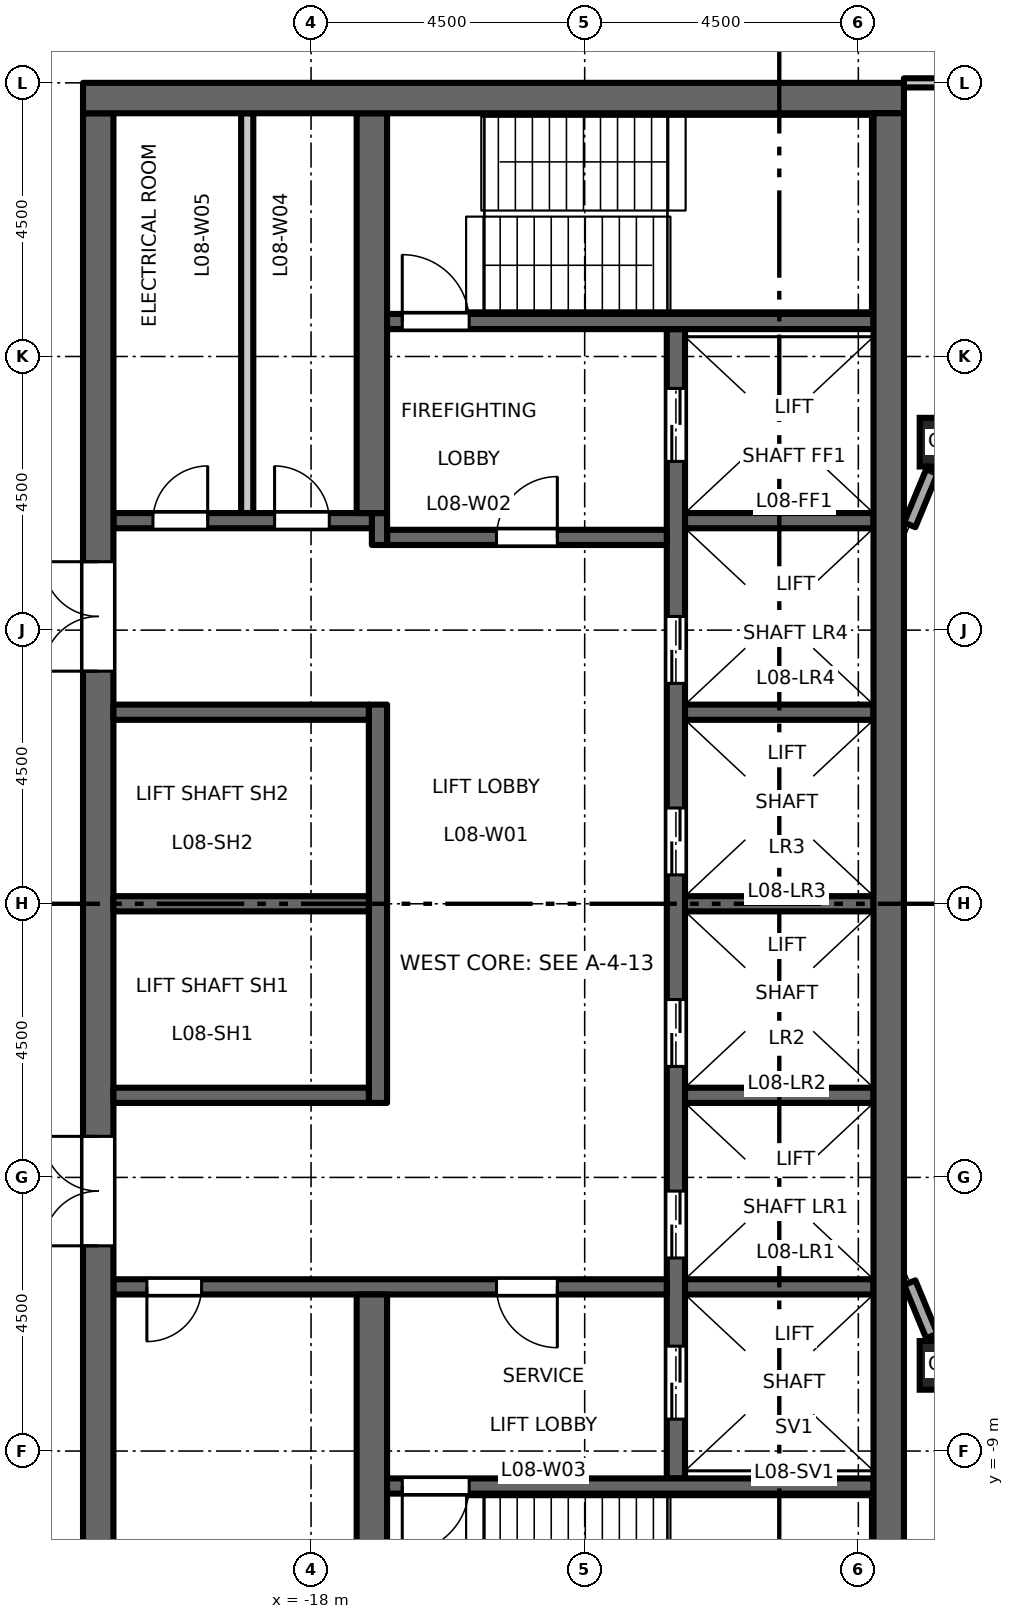
"""IFC4 building model, lengths in metres.
Left out: names, types, materials, properties, quantities, classifications, styles, units other than length and angle.
Written with IfcOpenShell. Run it as: python <this file> out.ifc"""

import sys

from ifc_helpers import new_model, si_unit, direction, frame, frame_2d, origin, origin_2d, place, context, subcontext, project, spatial, rectangle, hollow_rectangle, extrude, element, fill, save


model = new_model("IFC4")
c1 = context("Model", 3, precision=1e-05, world=origin(), true_north=direction((0.0, 1.0)))
c2 = subcontext(c1, "Body", "Model", "MODEL_VIEW")
j1 = project(units=[si_unit("LENGTHUNIT", "METRE"), si_unit("PLANEANGLEUNIT", "RADIAN")], contexts=[c1])
p1 = place(None, origin())
s1 = spatial("IfcSite", under=j1, at=p1, CompositionType="ELEMENT")
p2 = place(p1, origin())
s2 = spatial("IfcBuilding", under=s1, at=p2, CompositionType="ELEMENT")
p3 = place(p2, frame((0.0, 0.0, 40.2)))
s3 = spatial("IfcBuildingStorey", under=s2, at=p3, CompositionType="ELEMENT", Elevation=40.2)
for number, where, z_axis, x_axis in (
    (1, (-7.591, -7.591, 0.0), (0.0, 0.0, 1.0), (1.0, 0.0, 0.0)),
    (2, (-7.591, 7.591, 0.0), (0.0, 0.0, 1.0), (1.0, 0.0, 0.0)),
):
    element("IfcColumn", number, at=place(p3, frame(where, z_axis=z_axis, x_axis=x_axis)), inside=s3, PredefinedType="COLUMN", context=c2, shape_type="SweptSolid", body=[
        extrude(hollow_rectangle(XDim=0.8, YDim=0.8, WallThickness=0.05, at=origin_2d()), origin(), (0.0, 0.0, 1.0), 4.5),
    ])
p4 = place(p3, frame((-12.0, -9.45, 0.0), z_axis=(0.0, 0.0, 1.0), x_axis=(0.0, 1.0, 0.0)))
e3 = element("IfcWall", 3, at=p4, inside=s3, PredefinedType="SHEAR", context=c2, shape_type="SweptSolid", body=[
    extrude(rectangle(XDim=18.9, YDim=0.3, at=frame_2d((9.45, 0.0))), origin(), (0.0, 0.0, 1.0), 4.35),
])
p5 = place(p4, frame((3.625, 0.0, 0.0)))
e4 = element("IfcOpeningElement", 4, at=p5, cuts=e3, PredefinedType="OPENING", context=c2, shape_type="SweptSolid", body=[
    extrude(rectangle(XDim=1.1, YDim=2.1, at=frame_2d((0.55, 1.05))), frame((0.0, 0.16, 0.0), z_axis=(0.0, -1.0, 0.0), x_axis=(1.0, 0.0, 0.0)), (0.0, 0.0, 1.0), 0.32),
])
p6 = place(p4, frame((6.775, 0.0, 0.0)))
e5 = element("IfcOpeningElement", 5, at=p6, cuts=e3, PredefinedType="OPENING", context=c2, shape_type="SweptSolid", body=[
    extrude(rectangle(XDim=1.1, YDim=2.1, at=frame_2d((0.55, 1.05))), frame((0.0, 0.16, 0.0), z_axis=(0.0, -1.0, 0.0), x_axis=(1.0, 0.0, 0.0)), (0.0, 0.0, 1.0), 0.32),
])
p7 = place(p4, frame((9.925, 0.0, 0.0)))
e6 = element("IfcOpeningElement", 6, at=p7, cuts=e3, PredefinedType="OPENING", context=c2, shape_type="SweptSolid", body=[
    extrude(rectangle(XDim=1.1, YDim=2.1, at=frame_2d((0.55, 1.05))), frame((0.0, 0.16, 0.0), z_axis=(0.0, -1.0, 0.0), x_axis=(1.0, 0.0, 0.0)), (0.0, 0.0, 1.0), 0.32),
])
p8 = place(p4, frame((13.075, 0.0, 0.0)))
e7 = element("IfcOpeningElement", 7, at=p8, cuts=e3, PredefinedType="OPENING", context=c2, shape_type="SweptSolid", body=[
    extrude(rectangle(XDim=1.1, YDim=2.1, at=frame_2d((0.55, 1.05))), frame((0.0, 0.16, 0.0), z_axis=(0.0, -1.0, 0.0), x_axis=(1.0, 0.0, 0.0)), (0.0, 0.0, 1.0), 0.32),
])
p9 = place(p4, frame((16.725, 0.0, 0.0)))
e8 = element("IfcOpeningElement", 8, at=p9, cuts=e3, PredefinedType="OPENING", context=c2, shape_type="SweptSolid", body=[
    extrude(rectangle(XDim=1.2, YDim=2.1, at=frame_2d((0.6, 1.05))), frame((0.0, 0.16, 0.0), z_axis=(0.0, -1.0, 0.0), x_axis=(1.0, 0.0, 0.0)), (0.0, 0.0, 1.0), 0.32),
])
p10 = place(p4, frame((0.975, 0.0, 0.0)))
e9 = element("IfcOpeningElement", 9, at=p10, cuts=e3, PredefinedType="OPENING", context=c2, shape_type="SweptSolid", body=[
    extrude(rectangle(XDim=1.2, YDim=2.1, at=frame_2d((0.6, 1.05))), frame((0.0, 0.16, 0.0), z_axis=(0.0, -1.0, 0.0), x_axis=(1.0, 0.0, 0.0)), (0.0, 0.0, 1.0), 0.32),
])
p11 = place(p3, frame((-12.15, 6.025, 0.0), z_axis=(0.0, 0.0, 1.0), x_axis=(-1.0, 0.0, 0.0)))
e10 = element("IfcWall", 10, at=p11, inside=s3, PredefinedType="SHEAR", context=c2, shape_type="SweptSolid", body=[
    extrude(rectangle(XDim=4.6, YDim=0.25, at=frame_2d((2.3, 0.0))), origin(), (0.0, 0.0, 1.0), 4.35),
])
p12 = place(p11, frame((1.8, 0.0, 0.0)))
e11 = element("IfcOpeningElement", 11, at=p12, cuts=e10, PredefinedType="OPENING", context=c2, shape_type="SweptSolid", body=[
    extrude(rectangle(XDim=1.0, YDim=2.1, at=frame_2d((0.5, 1.05))), frame((0.0, 0.135, 0.0), z_axis=(0.0, -1.0, 0.0), x_axis=(1.0, 0.0, 0.0)), (0.0, 0.0, 1.0), 0.27),
])
p13 = place(p3, frame((-16.875, 5.9, 0.0), z_axis=(0.0, 0.0, 1.0), x_axis=(0.0, 1.0, 0.0)))
e12 = element("IfcWall", 12, at=p13, inside=s3, PredefinedType="SHEAR", context=c2, shape_type="SweptSolid", body=[
    extrude(rectangle(XDim=0.525, YDim=0.25, at=frame_2d((0.263, 0.0))), origin(), (0.0, 0.0, 1.0), 4.35),
])
p14 = place(p3, frame((-17.0, 6.3, 0.0), z_axis=(0.0, 0.0, 1.0), x_axis=(-1.0, 0.0, 0.0)))
e13 = element("IfcWall", 13, at=p14, inside=s3, PredefinedType="SHEAR", context=c2, shape_type="SweptSolid", body=[
    extrude(rectangle(XDim=4.25, YDim=0.25, at=frame_2d((2.125, 0.0))), origin(), (0.0, 0.0, 1.0), 4.35),
])
p15 = place(p14, frame((0.7, 0.0, 0.0)))
e14 = element("IfcOpeningElement", 14, at=p15, cuts=e13, PredefinedType="OPENING", context=c2, shape_type="SweptSolid", body=[
    extrude(rectangle(XDim=0.9, YDim=2.1, at=frame_2d((0.45, 1.05))), frame((0.0, 0.135, 0.0), z_axis=(0.0, -1.0, 0.0), x_axis=(1.0, 0.0, 0.0)), (0.0, 0.0, 1.0), 0.27),
])
p16 = place(p14, frame((2.7, 0.0, 0.0)))
e15 = element("IfcOpeningElement", 15, at=p16, cuts=e13, PredefinedType="OPENING", context=c2, shape_type="SweptSolid", body=[
    extrude(rectangle(XDim=0.9, YDim=2.1, at=frame_2d((0.45, 1.05))), frame((0.0, 0.135, 0.0), z_axis=(0.0, -1.0, 0.0), x_axis=(1.0, 0.0, 0.0)), (0.0, 0.0, 1.0), 0.27),
])
p17 = place(p3, frame((-12.15, -6.3, 0.0), z_axis=(0.0, 0.0, 1.0), x_axis=(-1.0, 0.0, 0.0)))
e16 = element("IfcWall", 16, at=p17, inside=s3, PredefinedType="SHEAR", context=c2, shape_type="SweptSolid", body=[
    extrude(rectangle(XDim=9.1, YDim=0.25, at=frame_2d((4.55, 0.0))), origin(), (0.0, 0.0, 1.0), 4.35),
])
p18 = place(p17, frame((1.8, 0.0, 0.0)))
e17 = element("IfcOpeningElement", 17, at=p18, cuts=e16, PredefinedType="OPENING", context=c2, shape_type="SweptSolid", body=[
    extrude(rectangle(XDim=1.0, YDim=2.1, at=frame_2d((0.5, 1.05))), frame((0.0, 0.135, 0.0), z_axis=(0.0, -1.0, 0.0), x_axis=(1.0, 0.0, 0.0)), (0.0, 0.0, 1.0), 0.27),
])
p19 = place(p17, frame((7.65, 0.0, 0.0)))
e18 = element("IfcOpeningElement", 18, at=p19, cuts=e16, PredefinedType="OPENING", context=c2, shape_type="SweptSolid", body=[
    extrude(rectangle(XDim=0.9, YDim=2.1, at=frame_2d((0.45, 1.05))), frame((0.0, 0.135, 0.0), z_axis=(0.0, -1.0, 0.0), x_axis=(1.0, 0.0, 0.0)), (0.0, 0.0, 1.0), 0.27),
])
p20 = place(p3, frame((-21.5, -13.0, 0.0), z_axis=(0.0, 0.0, 1.0), x_axis=(0.0, 1.0, 0.0)))
e19 = element("IfcWall", 19, at=p20, inside=s3, PredefinedType="SHEAR", context=c2, shape_type="SweptSolid", body=[
    extrude(rectangle(XDim=26.0, YDim=0.5, at=frame_2d((13.0, 0.0))), origin(), (0.0, 0.0, 1.0), 4.35),
])
p21 = place(p20, frame((16.825, 0.0, 0.0)))
e20 = element("IfcOpeningElement", 20, at=p21, cuts=e19, PredefinedType="OPENING", context=c2, shape_type="SweptSolid", body=[
    extrude(rectangle(XDim=1.8, YDim=2.1, at=frame_2d((0.9, 1.05))), frame((0.0, 0.26, 0.0), z_axis=(0.0, -1.0, 0.0), x_axis=(1.0, 0.0, 0.0)), (0.0, 0.0, 1.0), 0.52),
])
p22 = place(p20, frame((7.375, 0.0, 0.0)))
e21 = element("IfcOpeningElement", 21, at=p22, cuts=e19, PredefinedType="OPENING", context=c2, shape_type="SweptSolid", body=[
    extrude(rectangle(XDim=1.8, YDim=2.1, at=frame_2d((0.9, 1.05))), frame((0.0, 0.26, 0.0), z_axis=(0.0, -1.0, 0.0), x_axis=(1.0, 0.0, 0.0)), (0.0, 0.0, 1.0), 0.52),
])
p23 = place(p3, frame((-19.05, 6.425, 0.0), z_axis=(0.0, 0.0, 1.0), x_axis=(0.0, 1.0, 0.0)))
e22 = element("IfcWall", 22, at=p23, inside=s3, PredefinedType="PARTITIONING", context=c2, shape_type="SweptSolid", body=[
    extrude(rectangle(XDim=6.575, YDim=0.2, at=frame_2d((3.288, 0.0))), origin(), (0.0, 0.0, 1.0), 4.35),
])
p24 = place(p3, frame((-16.9, -3.275, 0.0), z_axis=(0.0, 0.0, 1.0), x_axis=(0.0, 1.0, 0.0)))
e23 = element("IfcWall", 23, at=p24, inside=s3, PredefinedType="SHEAR", context=c2, shape_type="SweptSolid", body=[
    extrude(rectangle(XDim=6.55, YDim=0.3, at=frame_2d((3.275, 0.0))), origin(), (0.0, 0.0, 1.0), 4.35),
])
for number, where, z_axis, x_axis in (
    (24, (-17.05, 0.0, 0.0), (0.0, 0.0, 1.0), (-1.0, 0.0, 0.0)),
    (25, (-17.05, 3.15, 0.0), (0.0, 0.0, 1.0), (-1.0, 0.0, 0.0)),
    (26, (-17.05, -3.15, 0.0), (0.0, 0.0, 1.0), (-1.0, 0.0, 0.0)),
):
    element("IfcWall", number, at=place(p3, frame(where, z_axis=z_axis, x_axis=x_axis)), inside=s3, PredefinedType="SHEAR", context=c2, shape_type="SweptSolid", body=[
        extrude(rectangle(XDim=4.2, YDim=0.25, at=frame_2d((2.1, 0.0))), origin(), (0.0, 0.0, 1.0), 4.35),
    ])
for number, where, z_axis, x_axis in (
    (27, (-17.0, 6.425, 0.0), (0.0, 0.0, 1.0), (0.0, 1.0, 0.0)),
    (28, (-17.0, -13.0, 0.0), (0.0, 0.0, 1.0), (0.0, 1.0, 0.0)),
):
    element("IfcWall", number, at=place(p3, frame(where, z_axis=z_axis, x_axis=x_axis)), inside=s3, PredefinedType="SHEAR", context=c2, shape_type="SweptSolid", body=[
        extrude(rectangle(XDim=6.575, YDim=0.5, at=frame_2d((3.288, 0.0))), origin(), (0.0, 0.0, 1.0), 4.35),
    ])
for number, where, z_axis, x_axis in (
    (29, (-8.75, 0.0, 0.0), (0.0, 0.0, 1.0), (-1.0, 0.0, 0.0)),
    (30, (-8.75, 3.15, 0.0), (0.0, 0.0, 1.0), (-1.0, 0.0, 0.0)),
    (31, (-8.75, 6.3, 0.0), (0.0, 0.0, 1.0), (-1.0, 0.0, 0.0)),
    (32, (-8.75, -3.15, 0.0), (0.0, 0.0, 1.0), (-1.0, 0.0, 0.0)),
    (33, (-8.75, -6.3, 0.0), (0.0, 0.0, 1.0), (-1.0, 0.0, 0.0)),
):
    element("IfcWall", number, at=place(p3, frame(where, z_axis=z_axis, x_axis=x_axis)), inside=s3, PredefinedType="SHEAR", context=c2, shape_type="SweptSolid", body=[
        extrude(rectangle(XDim=3.1, YDim=0.25, at=frame_2d((1.55, 0.0))), origin(), (0.0, 0.0, 1.0), 4.35),
    ])
p25 = place(p3, frame((-8.75, 9.575, 0.0), z_axis=(0.0, 0.0, 1.0), x_axis=(-1.0, 0.0, 0.0)))
e34 = element("IfcWall", 34, at=p25, inside=s3, PredefinedType="SHEAR", context=c2, shape_type="SweptSolid", body=[
    extrude(rectangle(XDim=8.0, YDim=0.25, at=frame_2d((4.0, 0.0))), origin(), (0.0, 0.0, 1.0), 4.35),
])
p26 = place(p25, frame((6.65, 0.0, 0.0)))
e35 = element("IfcOpeningElement", 35, at=p26, cuts=e34, PredefinedType="OPENING", context=c2, shape_type="SweptSolid", body=[
    extrude(rectangle(XDim=1.1, YDim=2.1, at=frame_2d((0.55, 1.05))), frame((0.0, 0.135, 0.0), z_axis=(0.0, -1.0, 0.0), x_axis=(1.0, 0.0, 0.0)), (0.0, 0.0, 1.0), 0.27),
])
p27 = place(p3, frame((-8.75, -9.575, 0.0), z_axis=(0.0, 0.0, 1.0), x_axis=(-1.0, 0.0, 0.0)))
e36 = element("IfcWall", 36, at=p27, inside=s3, PredefinedType="SHEAR", context=c2, shape_type="SweptSolid", body=[
    extrude(rectangle(XDim=8.0, YDim=0.25, at=frame_2d((4.0, 0.0))), origin(), (0.0, 0.0, 1.0), 4.35),
])
p28 = place(p27, frame((6.65, 0.0, 0.0)))
e37 = element("IfcOpeningElement", 37, at=p28, cuts=e36, PredefinedType="OPENING", context=c2, shape_type="SweptSolid", body=[
    extrude(rectangle(XDim=1.1, YDim=2.1, at=frame_2d((0.55, 1.05))), frame((0.0, 0.135, 0.0), z_axis=(0.0, -1.0, 0.0), x_axis=(1.0, 0.0, 0.0)), (0.0, 0.0, 1.0), 0.27),
])
p29 = place(p3, frame((-8.25, 13.25, 0.0), z_axis=(0.0, 0.0, 1.0), x_axis=(-1.0, 0.0, 0.0)))
e38 = element("IfcWall", 38, at=p29, inside=s3, PredefinedType="SHEAR", context=c2, shape_type="SweptSolid", body=[
    extrude(rectangle(XDim=13.5, YDim=0.5, at=frame_2d((6.75, 0.0))), origin(), (0.0, 0.0, 1.0), 4.35),
])
p30 = place(p3, frame((-8.5, -13.0, 0.0), z_axis=(0.0, 0.0, 1.0), x_axis=(0.0, 1.0, 0.0)))
e39 = element("IfcWall", 39, at=p30, inside=s3, PredefinedType="SHEAR", context=c2, shape_type="SweptSolid", body=[
    extrude(rectangle(XDim=26.0, YDim=0.5, at=frame_2d((13.0, 0.0))), origin(), (0.0, 0.0, 1.0), 4.35),
])
for number, where, z_axis, x_axis in (
    (40, (-7.791, 7.108, 0.0), (0.0, 0.0, 1.0), (-0.383, -0.924, 0.0)),
    (41, (-8.154, -6.231, 0.0), (0.0, 0.0, 1.0), (0.383, -0.924, 0.0)),
):
    element("IfcWall", number, at=place(p3, frame(where, z_axis=z_axis, x_axis=x_axis)), inside=s3, PredefinedType="STANDARD", context=c2, shape_type="SweptSolid", body=[
        extrude(rectangle(XDim=0.949, YDim=0.2, at=frame_2d((0.475, 0.0))), origin(), (0.0, 0.0, 1.0), 3.73),
    ])
p31 = place(p3, frame((-8.25, 13.5, 0.0), z_axis=(0.0, 0.0, 1.0), x_axis=(1.0, 0.0, 0.0)))
e42 = element("IfcWall", 42, at=p31, inside=s3, PredefinedType="PARTITIONING", context=c2, shape_type="SweptSolid", body=[
    extrude(rectangle(XDim=16.5, YDim=0.15, at=frame_2d((8.25, 0.0))), origin(), (0.0, 0.0, 1.0), 3.85),
])
p32 = place(p31, frame((0.65, 0.0, 0.0)))
e43 = element("IfcOpeningElement", 43, at=p32, cuts=e42, PredefinedType="OPENING", context=c2, shape_type="SweptSolid", body=[
    extrude(rectangle(XDim=1.0, YDim=2.1, at=frame_2d((0.5, 1.05))), frame((0.0, 0.085, 0.0), z_axis=(0.0, -1.0, 0.0), x_axis=(1.0, 0.0, 0.0)), (0.0, 0.0, 1.0), 0.17),
])
p33 = place(p12, origin())
e44 = element("IfcDoor", 44, at=p33, inside=s3, OperationType="SINGLE_SWING_LEFT", PredefinedType="DOOR", context=c2, shape_type="SweptSolid", body=[
    extrude(rectangle(XDim=1.0, YDim=2.1, at=frame_2d((0.5, 1.05))), frame((0.0, 0.025, 0.0), z_axis=(0.0, -1.0, 0.0), x_axis=(1.0, 0.0, 0.0)), (0.0, 0.0, 1.0), 0.05),
])
fill(e11, e44)
p34 = place(p18, origin())
e45 = element("IfcDoor", 45, at=p34, inside=s3, OperationType="SINGLE_SWING_RIGHT", PredefinedType="DOOR", context=c2, shape_type="SweptSolid", body=[
    extrude(rectangle(XDim=1.0, YDim=2.1, at=frame_2d((0.5, 1.05))), frame((0.0, 0.025, 0.0), z_axis=(0.0, -1.0, 0.0), x_axis=(1.0, 0.0, 0.0)), (0.0, 0.0, 1.0), 0.05),
])
fill(e17, e45)
p35 = place(p26, origin())
e46 = element("IfcDoor", 46, at=p35, inside=s3, OperationType="SINGLE_SWING_RIGHT", PredefinedType="DOOR", context=c2, shape_type="SweptSolid", body=[
    extrude(rectangle(XDim=1.1, YDim=2.1, at=frame_2d((0.55, 1.05))), frame((0.0, 0.025, 0.0), z_axis=(0.0, -1.0, 0.0), x_axis=(1.0, 0.0, 0.0)), (0.0, 0.0, 1.0), 0.05),
])
fill(e35, e46)
p36 = place(p28, origin())
e47 = element("IfcDoor", 47, at=p36, inside=s3, OperationType="SINGLE_SWING_LEFT", PredefinedType="DOOR", context=c2, shape_type="SweptSolid", body=[
    extrude(rectangle(XDim=1.1, YDim=2.1, at=frame_2d((0.55, 1.05))), frame((0.0, 0.025, 0.0), z_axis=(0.0, -1.0, 0.0), x_axis=(1.0, 0.0, 0.0)), (0.0, 0.0, 1.0), 0.05),
])
fill(e37, e47)
p37 = place(p21, origin())
e48 = element("IfcDoor", 48, at=p37, inside=s3, OperationType="DOUBLE_DOOR_DOUBLE_SWING", PredefinedType="DOOR", context=c2, shape_type="SweptSolid", body=[
    extrude(rectangle(XDim=1.8, YDim=2.1, at=frame_2d((0.9, 1.05))), frame((0.0, 0.025, 0.0), z_axis=(0.0, -1.0, 0.0), x_axis=(1.0, 0.0, 0.0)), (0.0, 0.0, 1.0), 0.05),
])
fill(e20, e48)
p38 = place(p22, origin())
e49 = element("IfcDoor", 49, at=p38, inside=s3, OperationType="DOUBLE_DOOR_DOUBLE_SWING", PredefinedType="DOOR", context=c2, shape_type="SweptSolid", body=[
    extrude(rectangle(XDim=1.8, YDim=2.1, at=frame_2d((0.9, 1.05))), frame((0.0, 0.025, 0.0), z_axis=(0.0, -1.0, 0.0), x_axis=(1.0, 0.0, 0.0)), (0.0, 0.0, 1.0), 0.05),
])
fill(e21, e49)
p39 = place(p5, origin())
e50 = element("IfcDoor", 50, at=p39, inside=s3, OperationType="DOUBLE_DOOR_SLIDING", PredefinedType="DOOR", context=c2, shape_type="SweptSolid", body=[
    extrude(rectangle(XDim=1.1, YDim=2.1, at=frame_2d((0.55, 1.05))), frame((0.0, 0.025, 0.0), z_axis=(0.0, -1.0, 0.0), x_axis=(1.0, 0.0, 0.0)), (0.0, 0.0, 1.0), 0.05),
])
fill(e4, e50)
p40 = place(p6, origin())
e51 = element("IfcDoor", 51, at=p40, inside=s3, OperationType="DOUBLE_DOOR_SLIDING", PredefinedType="DOOR", context=c2, shape_type="SweptSolid", body=[
    extrude(rectangle(XDim=1.1, YDim=2.1, at=frame_2d((0.55, 1.05))), frame((0.0, 0.025, 0.0), z_axis=(0.0, -1.0, 0.0), x_axis=(1.0, 0.0, 0.0)), (0.0, 0.0, 1.0), 0.05),
])
fill(e5, e51)
p41 = place(p7, origin())
e52 = element("IfcDoor", 52, at=p41, inside=s3, OperationType="DOUBLE_DOOR_SLIDING", PredefinedType="DOOR", context=c2, shape_type="SweptSolid", body=[
    extrude(rectangle(XDim=1.1, YDim=2.1, at=frame_2d((0.55, 1.05))), frame((0.0, 0.025, 0.0), z_axis=(0.0, -1.0, 0.0), x_axis=(1.0, 0.0, 0.0)), (0.0, 0.0, 1.0), 0.05),
])
fill(e6, e52)
p42 = place(p8, origin())
e53 = element("IfcDoor", 53, at=p42, inside=s3, OperationType="DOUBLE_DOOR_SLIDING", PredefinedType="DOOR", context=c2, shape_type="SweptSolid", body=[
    extrude(rectangle(XDim=1.1, YDim=2.1, at=frame_2d((0.55, 1.05))), frame((0.0, 0.025, 0.0), z_axis=(0.0, -1.0, 0.0), x_axis=(1.0, 0.0, 0.0)), (0.0, 0.0, 1.0), 0.05),
])
fill(e7, e53)
p43 = place(p9, origin())
e54 = element("IfcDoor", 54, at=p43, inside=s3, OperationType="DOUBLE_DOOR_SLIDING", PredefinedType="DOOR", context=c2, shape_type="SweptSolid", body=[
    extrude(rectangle(XDim=1.2, YDim=2.1, at=frame_2d((0.6, 1.05))), frame((0.0, 0.025, 0.0), z_axis=(0.0, -1.0, 0.0), x_axis=(1.0, 0.0, 0.0)), (0.0, 0.0, 1.0), 0.05),
])
fill(e8, e54)
p44 = place(p10, origin())
e55 = element("IfcDoor", 55, at=p44, inside=s3, OperationType="DOUBLE_DOOR_SLIDING", PredefinedType="DOOR", context=c2, shape_type="SweptSolid", body=[
    extrude(rectangle(XDim=1.2, YDim=2.1, at=frame_2d((0.6, 1.05))), frame((0.0, 0.025, 0.0), z_axis=(0.0, -1.0, 0.0), x_axis=(1.0, 0.0, 0.0)), (0.0, 0.0, 1.0), 0.05),
])
fill(e9, e55)
p45 = place(p15, origin())
e56 = element("IfcDoor", 56, at=p45, inside=s3, OperationType="SINGLE_SWING_RIGHT", PredefinedType="DOOR", context=c2, shape_type="SweptSolid", body=[
    extrude(rectangle(XDim=0.9, YDim=2.1, at=frame_2d((0.45, 1.05))), frame((0.0, 0.025, 0.0), z_axis=(0.0, -1.0, 0.0), x_axis=(1.0, 0.0, 0.0)), (0.0, 0.0, 1.0), 0.05),
])
fill(e14, e56)
p46 = place(p16, origin())
e57 = element("IfcDoor", 57, at=p46, inside=s3, OperationType="SINGLE_SWING_LEFT", PredefinedType="DOOR", context=c2, shape_type="SweptSolid", body=[
    extrude(rectangle(XDim=0.9, YDim=2.1, at=frame_2d((0.45, 1.05))), frame((0.0, 0.025, 0.0), z_axis=(0.0, -1.0, 0.0), x_axis=(1.0, 0.0, 0.0)), (0.0, 0.0, 1.0), 0.05),
])
fill(e15, e57)
p47 = place(p19, origin())
e58 = element("IfcDoor", 58, at=p47, inside=s3, OperationType="SINGLE_SWING_LEFT", PredefinedType="DOOR", context=c2, shape_type="SweptSolid", body=[
    extrude(rectangle(XDim=0.9, YDim=2.1, at=frame_2d((0.45, 1.05))), frame((0.0, 0.025, 0.0), z_axis=(0.0, -1.0, 0.0), x_axis=(1.0, 0.0, 0.0)), (0.0, 0.0, 1.0), 0.05),
])
fill(e18, e58)
save(model, sys.argv[1])
